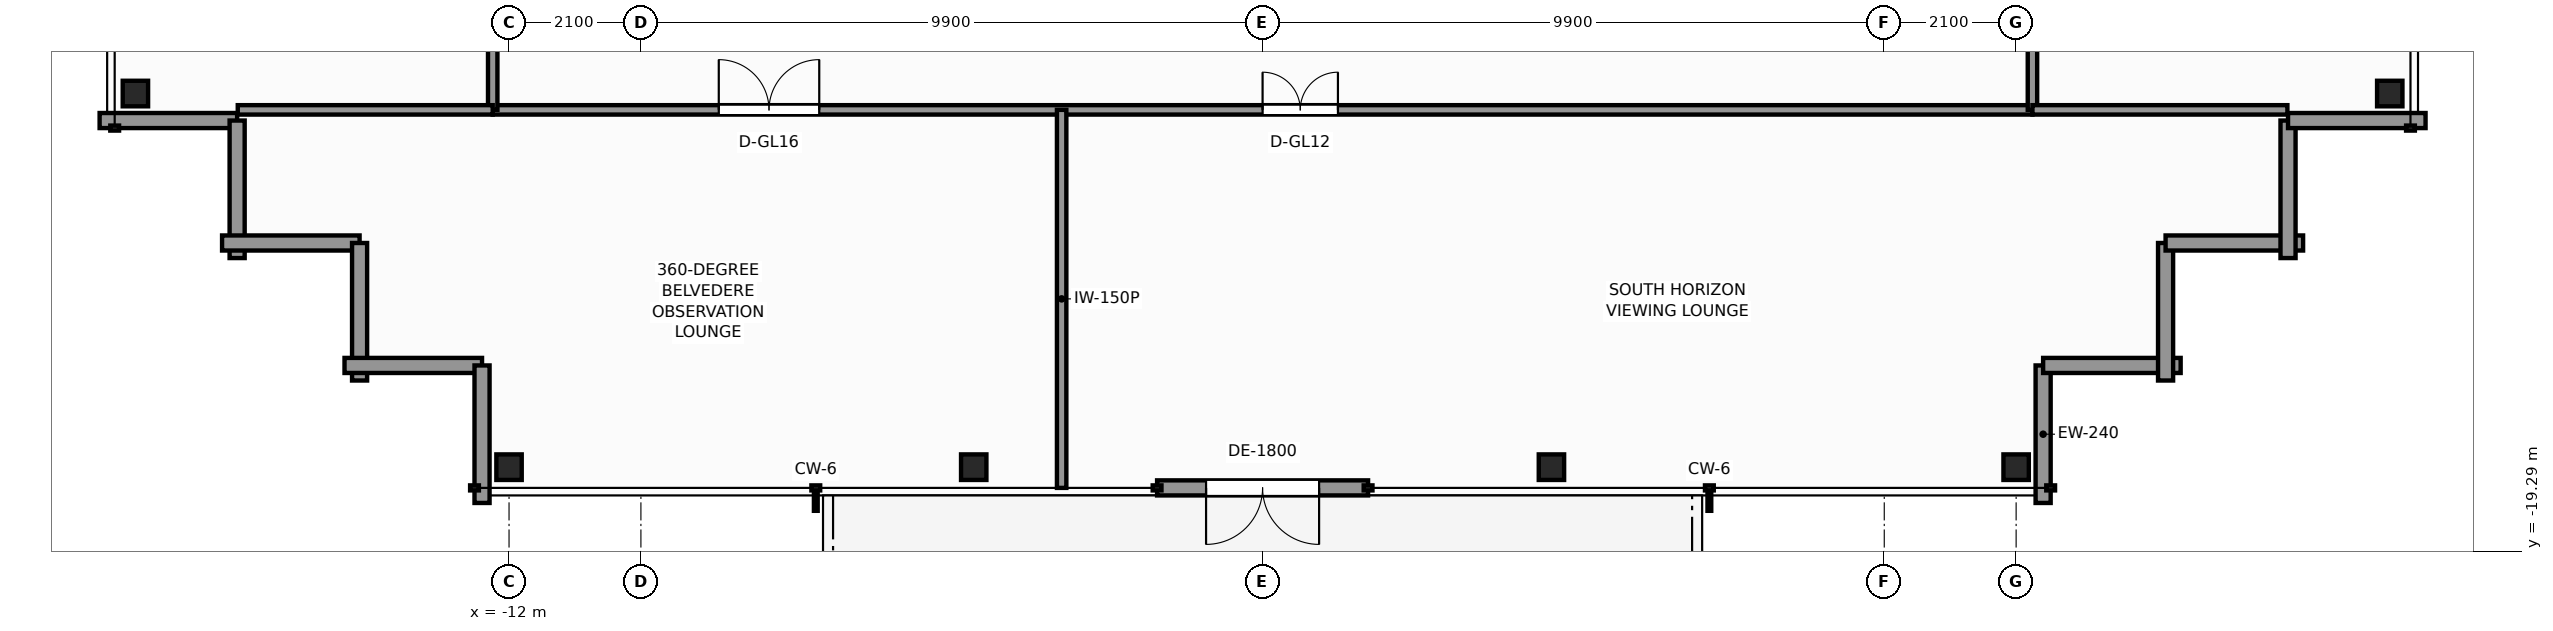
"""IFC4 building model, lengths in metres.
Left out: names, types, materials, properties, quantities, classifications, styles, units other than length and angle.
Written with IfcOpenShell. Run it as: python <this file> out.ifc"""

import sys

from ifc_helpers import new_model, si_unit, direction, frame, frame_2d, origin, origin_2d, place, context, subcontext, project, spatial, rectangle, i_section, extrude, element, fill, save


model = new_model("IFC4")
c1 = context("Model", 3, precision=1e-05, world=origin(), true_north=direction((0.0, 1.0)))
c2 = subcontext(c1, "Body", "Model", "MODEL_VIEW")
j1 = project(units=[si_unit("LENGTHUNIT", "METRE"), si_unit("PLANEANGLEUNIT", "RADIAN")], contexts=[c1])
p1 = place(None, origin())
s1 = spatial("IfcSite", under=j1, at=p1, CompositionType="ELEMENT")
p2 = place(p1, origin())
s2 = spatial("IfcBuilding", under=s1, at=p2, CompositionType="ELEMENT")
p3 = place(p2, frame((0.0, 0.0, 267.4)))
s3 = spatial("IfcBuildingStorey", under=s2, at=p3, CompositionType="ELEMENT", Elevation=267.4)
for number, where, z_axis, x_axis in (
    (1, (-12.0, -17.95, 0.0), (0.0, 0.0, 1.0), (1.0, 0.0, 0.0)),
    (2, (-4.6, -17.95, 0.0), (0.0, 0.0, 1.0), (1.0, 0.0, 0.0)),
    (3, (4.6, -17.95, 0.0), (0.0, 0.0, 1.0), (1.0, 0.0, 0.0)),
    (4, (12.0, -17.95, 0.0), (0.0, 0.0, 1.0), (1.0, 0.0, 0.0)),
    (5, (-17.95, -12.0, 0.0), (0.0, 0.0, 1.0), (1.0, 0.0, 0.0)),
    (6, (17.95, -12.0, 0.0), (0.0, 0.0, 1.0), (1.0, 0.0, 0.0)),
):
    element("IfcColumn", number, at=place(p3, frame(where, z_axis=z_axis, x_axis=x_axis)), inside=s3, PredefinedType="COLUMN", context=c2, shape_type="SweptSolid", body=[
        extrude(i_section(OverallWidth=0.404, OverallDepth=0.407, WebThickness=0.027, FlangeThickness=0.044, FilletRadius=0.025, at=origin_2d()), origin(), (0.0, 0.0, 1.0), 5.0),
    ])
p4 = place(p3, frame((1.68, -18.28, 0.0), z_axis=(0.0, 0.0, 1.0), x_axis=(-1.0, 0.0, 0.0)))
e7 = element("IfcWall", 7, at=p4, inside=s3, PredefinedType="STANDARD", context=c2, shape_type="SweptSolid", body=[
    extrude(rectangle(XDim=3.36, YDim=0.24, at=frame_2d((1.68, 0.0))), origin(), (0.0, 0.0, 1.0), 4.7),
])
p5 = place(p4, frame((0.78, 0.0, 0.0)))
e8 = element("IfcOpeningElement", 8, at=p5, cuts=e7, PredefinedType="OPENING", context=c2, shape_type="SweptSolid", body=[
    extrude(rectangle(XDim=1.8, YDim=2.3, at=frame_2d((0.9, 1.15))), frame((0.0, 0.13, 0.0), z_axis=(0.0, -1.0, 0.0), x_axis=(1.0, 0.0, 0.0)), (0.0, 0.0, 1.0), 0.26),
])
p6 = place(p3, frame((12.43, -16.33, 0.0), z_axis=(0.0, 0.0, 1.0), x_axis=(0.0, -1.0, 0.0)))
e9 = element("IfcWall", 9, at=p6, inside=s3, PredefinedType="STANDARD", context=c2, shape_type="SweptSolid", body=[
    extrude(rectangle(XDim=2.19, YDim=0.24, at=frame_2d((1.095, 0.0))), origin(), (0.0, 0.0, 1.0), 4.083),
])
for number, where, z_axis, x_axis in (
    (10, (14.62, -16.33, 0.0), (0.0, 0.0, 1.0), (-1.0, 0.0, 0.0)),
    (11, (14.38, -14.38, 0.0), (0.0, 0.0, 1.0), (0.0, -1.0, 0.0)),
    (12, (16.57, -14.38, 0.0), (0.0, 0.0, 1.0), (-1.0, 0.0, 0.0)),
    (13, (16.33, -12.43, 0.0), (0.0, 0.0, 1.0), (0.0, -1.0, 0.0)),
):
    element("IfcWall", number, at=place(p3, frame(where, z_axis=z_axis, x_axis=x_axis)), inside=s3, PredefinedType="STANDARD", context=c2, shape_type="SweptSolid", body=[
        extrude(rectangle(XDim=2.19, YDim=0.24, at=frame_2d((1.095, 0.0))), origin(), (0.0, 0.0, 1.0), 4.083),
    ])
for number, where, z_axis, x_axis in (
    (14, (18.52, -12.43, 0.0), (0.0, 0.0, 1.0), (-1.0, 0.0, 0.0)),
    (15, (-16.33, -12.43, 0.0), (0.0, 0.0, 1.0), (-1.0, 0.0, 0.0)),
):
    element("IfcWall", number, at=place(p3, frame(where, z_axis=z_axis, x_axis=x_axis)), inside=s3, PredefinedType="STANDARD", context=c2, shape_type="SweptSolid", body=[
        extrude(rectangle(XDim=2.19, YDim=0.24, at=frame_2d((1.095, 0.0))), origin(), (0.0, 0.0, 1.0), 4.083),
    ])
for number, where, z_axis, x_axis in (
    (16, (-16.33, -14.62, 0.0), (0.0, 0.0, 1.0), (0.0, 1.0, 0.0)),
    (17, (-14.38, -14.38, 0.0), (0.0, 0.0, 1.0), (-1.0, 0.0, 0.0)),
    (18, (-14.38, -16.57, 0.0), (0.0, 0.0, 1.0), (0.0, 1.0, 0.0)),
    (19, (-12.43, -16.33, 0.0), (0.0, 0.0, 1.0), (-1.0, 0.0, 0.0)),
):
    element("IfcWall", number, at=place(p3, frame(where, z_axis=z_axis, x_axis=x_axis)), inside=s3, PredefinedType="STANDARD", context=c2, shape_type="SweptSolid", body=[
        extrude(rectangle(XDim=2.19, YDim=0.24, at=frame_2d((1.095, 0.0))), origin(), (0.0, 0.0, 1.0), 4.083),
    ])
p7 = place(p3, frame((-12.43, -18.52, 0.0), z_axis=(0.0, 0.0, 1.0), x_axis=(0.0, 1.0, 0.0)))
e20 = element("IfcWall", 20, at=p7, inside=s3, PredefinedType="STANDARD", context=c2, shape_type="SweptSolid", body=[
    extrude(rectangle(XDim=2.19, YDim=0.24, at=frame_2d((1.095, 0.0))), origin(), (0.0, 0.0, 1.0), 4.083),
])
p8 = place(p3, frame((-12.26, -12.26, 0.0), z_axis=(0.0, 0.0, 1.0), x_axis=(1.0, 0.0, 0.0)))
e21 = element("IfcWall", 21, at=p8, inside=s3, PredefinedType="PARTITIONING", context=c2, shape_type="SweptSolid", body=[
    extrude(rectangle(XDim=24.52, YDim=0.15, at=frame_2d((12.26, 0.0))), origin(), (0.0, 0.0, 1.0), 3.989),
])
p9 = place(p8, frame((3.6, 0.0, 0.0)))
e22 = element("IfcOpeningElement", 22, at=p9, cuts=e21, PredefinedType="OPENING", context=c2, shape_type="SweptSolid", body=[
    extrude(rectangle(XDim=1.6, YDim=2.3, at=frame_2d((0.8, 1.15))), frame((0.0, 0.085, 0.0), z_axis=(0.0, -1.0, 0.0), x_axis=(1.0, 0.0, 0.0)), (0.0, 0.0, 1.0), 0.17),
])
p10 = place(p8, frame((12.26, 0.0, 0.0)))
e23 = element("IfcOpeningElement", 23, at=p10, cuts=e21, PredefinedType="OPENING", context=c2, shape_type="SweptSolid", body=[
    extrude(rectangle(XDim=1.2, YDim=2.2, at=frame_2d((0.6, 1.1))), frame((0.0, 0.085, 0.0), z_axis=(0.0, -1.0, 0.0), x_axis=(1.0, 0.0, 0.0)), (0.0, 0.0, 1.0), 0.17),
])
p11 = place(p3, frame((-12.26, -12.26, 0.0), z_axis=(0.0, 0.0, 1.0), x_axis=(0.0, 1.0, 0.0)))
e24 = element("IfcWall", 24, at=p11, inside=s3, PredefinedType="PARTITIONING", context=c2, shape_type="SweptSolid", body=[
    extrude(rectangle(XDim=24.52, YDim=0.15, at=frame_2d((12.26, 0.0))), origin(), (0.0, 0.0, 1.0), 3.989),
])
p12 = place(p11, frame((11.5, 0.0, 0.0)))
e25 = element("IfcOpeningElement", 25, at=p12, cuts=e24, PredefinedType="OPENING", context=c2, shape_type="SweptSolid", body=[
    extrude(rectangle(XDim=1.2, YDim=2.2, at=frame_2d((0.6, 1.1))), frame((0.0, 0.085, 0.0), z_axis=(0.0, -1.0, 0.0), x_axis=(1.0, 0.0, 0.0)), (0.0, 0.0, 1.0), 0.17),
])
p13 = place(p3, frame((12.26, -12.26, 0.0), z_axis=(0.0, 0.0, 1.0), x_axis=(0.0, 1.0, 0.0)))
e26 = element("IfcWall", 26, at=p13, inside=s3, PredefinedType="PARTITIONING", context=c2, shape_type="SweptSolid", body=[
    extrude(rectangle(XDim=24.52, YDim=0.15, at=frame_2d((12.26, 0.0))), origin(), (0.0, 0.0, 1.0), 3.989),
])
p14 = place(p13, frame((3.4, 0.0, 0.0)))
e27 = element("IfcOpeningElement", 27, at=p14, cuts=e26, PredefinedType="OPENING", context=c2, shape_type="SweptSolid", body=[
    extrude(rectangle(XDim=0.95, YDim=2.06, at=frame_2d((0.475, 1.03))), frame((0.0, 0.085, 0.0), z_axis=(0.0, -1.0, 0.0), x_axis=(1.0, 0.0, 0.0)), (0.0, 0.0, 1.0), 0.17),
])
p15 = place(p13, frame((20.22, 0.0, 0.0)))
e28 = element("IfcOpeningElement", 28, at=p15, cuts=e26, PredefinedType="OPENING", context=c2, shape_type="SweptSolid", body=[
    extrude(rectangle(XDim=0.95, YDim=2.06, at=frame_2d((0.475, 1.03))), frame((0.0, 0.085, 0.0), z_axis=(0.0, -1.0, 0.0), x_axis=(1.0, 0.0, 0.0)), (0.0, 0.0, 1.0), 0.17),
])
for number, where, z_axis, x_axis in (
    (29, (-16.32, -12.26, 0.0), (0.0, 0.0, 1.0), (1.0, 0.0, 0.0)),
    (30, (12.26, -12.26, 0.0), (0.0, 0.0, 1.0), (1.0, 0.0, 0.0)),
):
    element("IfcWall", number, at=place(p3, frame(where, z_axis=z_axis, x_axis=x_axis)), inside=s3, PredefinedType="PARTITIONING", context=c2, shape_type="SweptSolid", body=[
        extrude(rectangle(XDim=4.06, YDim=0.15, at=frame_2d((2.03, 0.0))), origin(), (0.0, 0.0, 1.0), 4.7),
    ])
p16 = place(p3, frame((-3.2, -18.28, 0.0), z_axis=(0.0, 0.0, 1.0), x_axis=(0.0, 1.0, 0.0)))
e31 = element("IfcWall", 31, at=p16, inside=s3, PredefinedType="PARTITIONING", context=c2, shape_type="SweptSolid", body=[
    extrude(rectangle(XDim=6.02, YDim=0.15, at=frame_2d((3.01, 0.0))), origin(), (0.0, 0.0, 1.0), 4.073),
])
p17 = place(p5, origin())
e32 = element("IfcDoor", 32, at=p17, inside=s3, OperationType="DOUBLE_DOOR_SINGLE_SWING", PredefinedType="DOOR", context=c2, shape_type="SweptSolid", body=[
    extrude(rectangle(XDim=1.8, YDim=2.3, at=frame_2d((0.9, 1.15))), frame((0.0, 0.025, 0.0), z_axis=(0.0, -1.0, 0.0), x_axis=(1.0, 0.0, 0.0)), (0.0, 0.0, 1.0), 0.05),
])
fill(e8, e32)
p18 = place(p9, origin())
e33 = element("IfcDoor", 33, at=p18, inside=s3, OperationType="DOUBLE_DOOR_SINGLE_SWING", PredefinedType="DOOR", context=c2, shape_type="SweptSolid", body=[
    extrude(rectangle(XDim=1.6, YDim=2.3, at=frame_2d((0.8, 1.15))), frame((0.0, 0.025, 0.0), z_axis=(0.0, -1.0, 0.0), x_axis=(1.0, 0.0, 0.0)), (0.0, 0.0, 1.0), 0.05),
])
fill(e22, e33)
p19 = place(p10, origin())
e34 = element("IfcDoor", 34, at=p19, inside=s3, OperationType="DOUBLE_DOOR_SINGLE_SWING", PredefinedType="DOOR", context=c2, shape_type="SweptSolid", body=[
    extrude(rectangle(XDim=1.2, YDim=2.2, at=frame_2d((0.6, 1.1))), frame((0.0, 0.025, 0.0), z_axis=(0.0, -1.0, 0.0), x_axis=(1.0, 0.0, 0.0)), (0.0, 0.0, 1.0), 0.05),
])
fill(e23, e34)
save(model, sys.argv[1])
